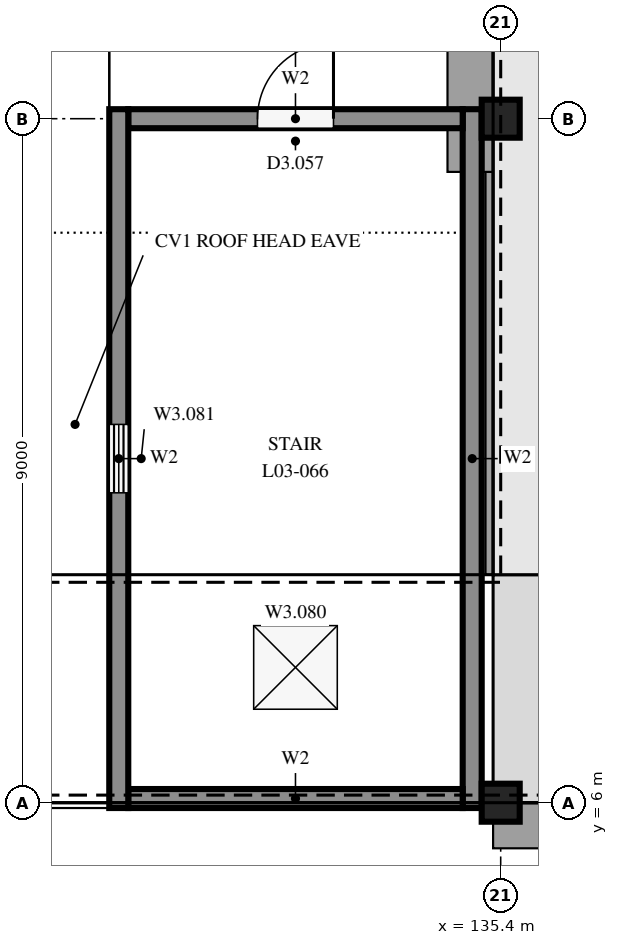
"""IFC4 building model, lengths in metres.
Left out: names, types, materials, properties, quantities, classifications, styles, units other than length and angle.
Written with IfcOpenShell. Run it as: python <this file> out.ifc"""

import sys

from ifc_helpers import new_model, si_unit, direction, frame, frame_2d, origin, origin_2d, place, context, subcontext, project, spatial, rectangle, extrude, element, fill, save


model = new_model("IFC4")
c1 = context("Model", 3, precision=1e-05, world=origin(), true_north=direction((0.0, 1.0)))
c2 = subcontext(c1, "Body", "Model", "MODEL_VIEW")
j1 = project(units=[si_unit("LENGTHUNIT", "METRE"), si_unit("PLANEANGLEUNIT", "RADIAN")], contexts=[c1])
p1 = place(None, origin())
s1 = spatial("IfcSite", under=j1, at=p1, CompositionType="ELEMENT")
p2 = place(p1, origin())
s2 = spatial("IfcBuilding", under=s1, at=p2, CompositionType="ELEMENT")
p3 = place(p2, frame((0.0, 0.0, 11.7)))
s3 = spatial("IfcBuildingStorey", under=s2, at=p3, CompositionType="ELEMENT", Elevation=11.7)
p4 = place(p3, frame((130.375, 5.93, 0.0), z_axis=(0.0, 0.0, 1.0), x_axis=(0.0, 1.0, 0.0)))
e1 = element("IfcWall", 1, at=p4, inside=s3, PredefinedType="SOLIDWALL", context=c2, shape_type="SweptSolid", body=[
    extrude(rectangle(XDim=9.195, YDim=0.25, at=frame_2d((4.598, 0.0))), origin(), (0.0, 0.0, 1.0), 2.45),
])
p5 = place(p4, frame((4.147, 0.0, 0.9)))
e2 = element("IfcOpeningElement", 2, at=p5, cuts=e1, PredefinedType="OPENING", context=c2, shape_type="SweptSolid", body=[
    extrude(rectangle(XDim=0.9, YDim=1.2, at=frame_2d((0.45, 0.6))), frame((0.0, 0.135, 0.0), z_axis=(0.0, -1.0, 0.0), x_axis=(1.0, 0.0, 0.0)), (0.0, 0.0, 1.0), 0.27),
])
p6 = place(p3, frame((135.025, 5.93, 0.0), z_axis=(0.0, 0.0, 1.0), x_axis=(0.0, 1.0, 0.0)))
e3 = element("IfcWall", 3, at=p6, inside=s3, PredefinedType="SOLIDWALL", context=c2, shape_type="SweptSolid", body=[
    extrude(rectangle(XDim=9.195, YDim=0.25, at=frame_2d((4.598, 0.0))), origin(), (0.0, 0.0, 1.0), 2.45),
])
p7 = place(p3, frame((130.5, 6.055, 0.0), z_axis=(0.0, 0.0, 1.0), x_axis=(1.0, 0.0, 0.0)))
e4 = element("IfcWall", 4, at=p7, inside=s3, PredefinedType="SOLIDWALL", context=c2, shape_type="SweptSolid", body=[
    extrude(rectangle(XDim=4.4, YDim=0.25, at=frame_2d((2.2, 0.0))), origin(), (0.0, 0.0, 1.0), 2.45),
])
p8 = place(p3, frame((130.5, 15.0, 0.0), z_axis=(0.0, 0.0, 1.0), x_axis=(1.0, 0.0, 0.0)))
e5 = element("IfcWall", 5, at=p8, inside=s3, PredefinedType="SOLIDWALL", context=c2, shape_type="SweptSolid", body=[
    extrude(rectangle(XDim=4.4, YDim=0.25, at=frame_2d((2.2, 0.0))), origin(), (0.0, 0.0, 1.0), 2.45),
])
p9 = place(p8, frame((1.7, 0.0, 0.0)))
e6 = element("IfcOpeningElement", 6, at=p9, cuts=e5, PredefinedType="OPENING", context=c2, shape_type="SweptSolid", body=[
    extrude(rectangle(XDim=1.0, YDim=2.1, at=frame_2d((0.5, 1.05))), frame((0.0, 0.135, 0.0), z_axis=(0.0, -1.0, 0.0), x_axis=(1.0, 0.0, 0.0)), (0.0, 0.0, 1.0), 0.27),
])
p10 = place(p3, frame((135.4, 6.0, 0.0), z_axis=(0.0, 0.0, 1.0), x_axis=(1.0, 0.0, 0.0)))
e7 = element("IfcColumn", 7, at=p10, inside=s3, PredefinedType="COLUMN", context=c2, shape_type="SweptSolid", body=[
    extrude(rectangle(XDim=0.5, YDim=0.5, at=origin_2d()), origin(), (0.0, 0.0, 1.0), 3.36),
])
p11 = place(p3, frame((135.4, 15.0, 0.0), z_axis=(0.0, 0.0, 1.0), x_axis=(1.0, 0.0, 0.0)))
e8 = element("IfcColumn", 8, at=p11, inside=s3, PredefinedType="COLUMN", context=c2, shape_type="SweptSolid", body=[
    extrude(rectangle(XDim=0.5, YDim=0.5, at=origin_2d()), origin(), (0.0, 0.0, 1.0), 2.41),
])
p12 = place(p3, frame((0.0, 0.0, 2.45)))
p13 = place(p12, frame((132.7, 7.78, 0.0)))
p14 = place(p13, frame((0.0, 0.0, 0.15)))
e9 = element("IfcWindow", 9, at=p14, inside=s3, PartitioningType="SINGLE_PANEL", PredefinedType="SKYLIGHT", context=c2, shape_type="SweptSolid", body=[
    extrude(rectangle(XDim=1.1, YDim=1.1, at=origin_2d()), origin(), (0.0, 0.0, 1.0), 0.05),
])
p15 = place(p9, origin())
e10 = element("IfcDoor", 10, at=p15, inside=s3, OperationType="SINGLE_SWING_RIGHT", PredefinedType="DOOR", context=c2, shape_type="SweptSolid", body=[
    extrude(rectangle(XDim=1.0, YDim=2.1, at=frame_2d((0.5, 1.05))), frame((0.0, 0.025, 0.0), z_axis=(0.0, -1.0, 0.0), x_axis=(1.0, 0.0, 0.0)), (0.0, 0.0, 1.0), 0.05),
])
fill(e6, e10)
p16 = place(p5, origin())
e11 = element("IfcWindow", 11, at=p16, inside=s3, PartitioningType="SINGLE_PANEL", PredefinedType="WINDOW", context=c2, shape_type="SweptSolid", body=[
    extrude(rectangle(XDim=0.9, YDim=1.2, at=frame_2d((0.45, 0.6))), frame((0.0, 0.03, 0.0), z_axis=(0.0, -1.0, 0.0), x_axis=(1.0, 0.0, 0.0)), (0.0, 0.0, 1.0), 0.06),
])
fill(e2, e11)
save(model, sys.argv[1])
